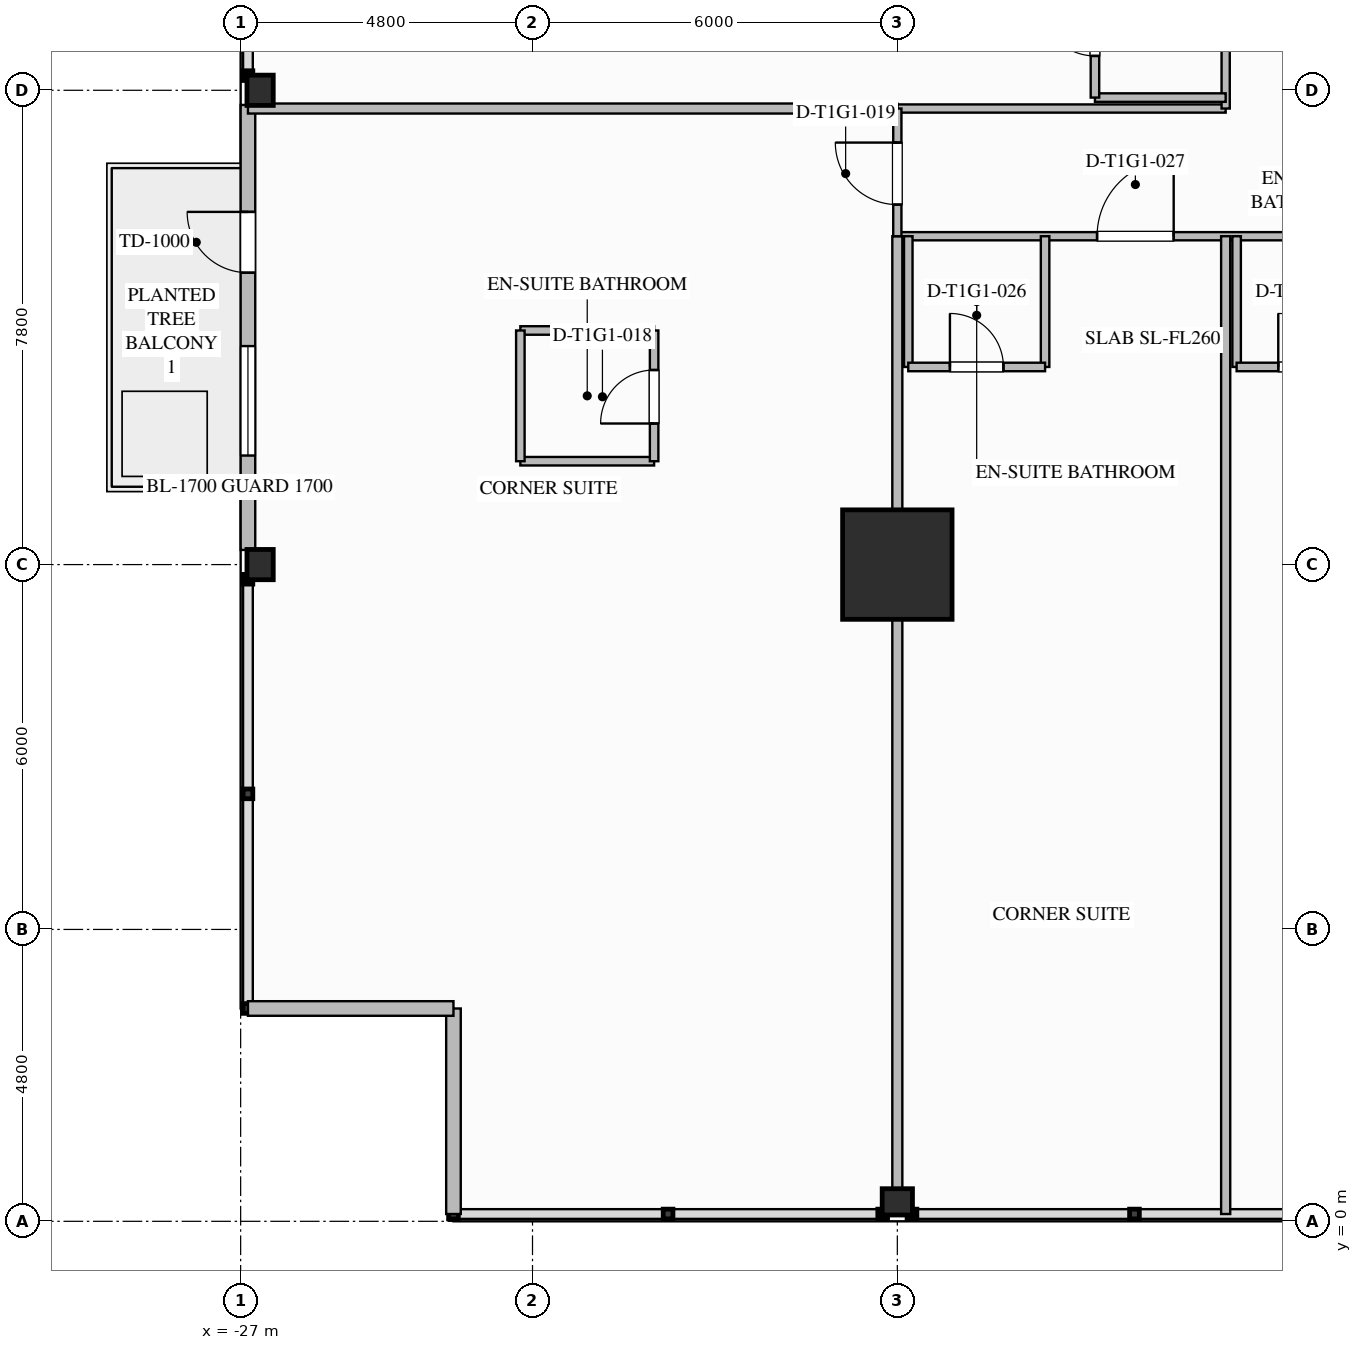
"""IFC4 building model, lengths in metres.
Left out: names, types, materials, properties, quantities, classifications, styles, units other than length and angle.
Written with IfcOpenShell. Run it as: python <this file> out.ifc"""

import sys

from ifc_helpers import new_model, si_unit, direction, frame, frame_2d, origin, origin_2d, place, context, subcontext, project, spatial, rectangle, i_section, extrude, element, fill, save


model = new_model("IFC4")
c1 = context("Model", 3, precision=1e-05, world=origin(), true_north=direction((0.0, 1.0)))
c2 = subcontext(c1, "Body", "Model", "MODEL_VIEW")
j1 = project(units=[si_unit("LENGTHUNIT", "METRE"), si_unit("PLANEANGLEUNIT", "RADIAN")], contexts=[c1])
p1 = place(None, origin())
s1 = spatial("IfcSite", under=j1, at=p1, CompositionType="ELEMENT")
p2 = place(p1, origin())
s2 = spatial("IfcBuilding", under=s1, at=p2, CompositionType="ELEMENT")
p3 = place(p2, frame((0.0, 0.0, 36.7)))
s3 = spatial("IfcBuildingStorey", under=s2, at=p3, CompositionType="ELEMENT", Elevation=36.7)
p4 = place(p3, frame((-16.2, 10.8, 0.0), z_axis=(0.0, 0.0, 1.0), x_axis=(1.0, 0.0, 0.0)))
e1 = element("IfcColumn", 1, at=p4, inside=s3, PredefinedType="COLUMN", context=c2, shape_type="SweptSolid", body=[
    extrude(rectangle(XDim=1.8, YDim=1.8, at=origin_2d()), origin(), (0.0, 0.0, 1.0), 3.5),
])
for number, where, z_axis, x_axis in (
    (2, (-26.68, 10.8, 0.0), (0.0, 0.0, 1.0), (1.0, 0.0, 0.0)),
    (3, (-26.68, 18.6, 0.0), (0.0, 0.0, 1.0), (1.0, 0.0, 0.0)),
    (4, (-16.2, 0.32, 0.0), (0.0, 0.0, 1.0), (0.0, 1.0, 0.0)),
):
    element("IfcColumn", number, at=place(p3, frame(where, z_axis=z_axis, x_axis=x_axis)), inside=s3, PredefinedType="COLUMN", context=c2, shape_type="SweptSolid", body=[
        extrude(i_section(OverallWidth=0.432, OverallDepth=0.498, WebThickness=0.056, FlangeThickness=0.089, FilletRadius=0.03, at=origin_2d()), origin(), (0.0, 0.0, 1.0), 3.497),
    ])
p5 = place(p3, frame((-26.88, 11.041, 0.0), z_axis=(0.0, 0.0, 1.0), x_axis=(0.0, 1.0, 0.0)))
e5 = element("IfcWall", 5, at=p5, inside=s3, PredefinedType="STANDARD", context=c2, shape_type="SweptSolid", body=[
    extrude(rectangle(XDim=7.318, YDim=0.24, at=frame_2d((3.659, 0.0))), origin(), (0.0, 0.0, 1.0), 2.629),
])
p6 = place(p5, frame((4.559, 0.0, 0.0)))
e6 = element("IfcOpeningElement", 6, at=p6, cuts=e5, PredefinedType="OPENING", context=c2, shape_type="SweptSolid", body=[
    extrude(rectangle(XDim=1.0, YDim=2.2, at=frame_2d((0.5, 1.1))), frame((0.0, 0.13, 0.0), z_axis=(0.0, -1.0, 0.0), x_axis=(1.0, 0.0, 0.0)), (0.0, 0.0, 1.0), 0.26),
])
p7 = place(p5, frame((1.552, 0.0, 0.75)))
e7 = element("IfcOpeningElement", 7, at=p7, cuts=e5, PredefinedType="OPENING", context=c2, shape_type="SweptSolid", body=[
    extrude(rectangle(XDim=1.8, YDim=1.779, at=frame_2d((0.9, 0.89))), frame((0.0, 0.13, 0.0), z_axis=(0.0, -1.0, 0.0), x_axis=(1.0, 0.0, 0.0)), (0.0, 0.0, 1.0), 0.26),
])
for number, where, z_axis, x_axis in (
    (8, (-23.5, 0.12, 0.0), (0.0, 0.0, 1.0), (0.0, 1.0, 0.0)),
    (9, (-23.5, 3.5, 0.0), (0.0, 0.0, 1.0), (-1.0, 0.0, 0.0)),
):
    element("IfcWall", number, at=place(p3, frame(where, z_axis=z_axis, x_axis=x_axis)), inside=s3, PredefinedType="STANDARD", context=c2, shape_type="SweptSolid", body=[
        extrude(rectangle(XDim=3.38, YDim=0.24, at=frame_2d((1.69, 0.0))), origin(), (0.0, 0.0, 1.0), 3.24),
    ])
p8 = place(p3, frame((-16.2, 16.2, 0.0), z_axis=(0.0, 0.0, 1.0), x_axis=(1.0, 0.0, 0.0)))
e10 = element("IfcWall", 10, at=p8, inside=s3, PredefinedType="PARTITIONING", context=c2, shape_type="SweptSolid", body=[
    extrude(rectangle(XDim=32.4, YDim=0.135, at=frame_2d((16.2, 0.0))), origin(), (0.0, 0.0, 1.0), 3.24),
])
p9 = place(p8, frame((3.285, 0.0, 0.0)))
e11 = element("IfcOpeningElement", 11, at=p9, cuts=e10, PredefinedType="OPENING", context=c2, shape_type="SweptSolid", body=[
    extrude(rectangle(XDim=1.26, YDim=2.2, at=frame_2d((0.63, 1.1))), frame((0.0, 0.077, 0.0), z_axis=(0.0, -1.0, 0.0), x_axis=(1.0, 0.0, 0.0)), (0.0, 0.0, 1.0), 0.155),
])
p10 = place(p8, frame((8.59, 0.0, 0.0)))
e12 = element("IfcOpeningElement", 12, at=p10, cuts=e10, PredefinedType="OPENING", context=c2, shape_type="SweptSolid", body=[
    extrude(rectangle(XDim=0.96, YDim=2.15, at=frame_2d((0.48, 1.075))), frame((0.0, 0.077, 0.0), z_axis=(0.0, -1.0, 0.0), x_axis=(1.0, 0.0, 0.0)), (0.0, 0.0, 1.0), 0.155),
])
p11 = place(p8, frame((13.84, 0.0, 0.0)))
e13 = element("IfcOpeningElement", 13, at=p11, cuts=e10, PredefinedType="OPENING", context=c2, shape_type="SweptSolid", body=[
    extrude(rectangle(XDim=1.26, YDim=2.2, at=frame_2d((0.63, 1.1))), frame((0.0, 0.077, 0.0), z_axis=(0.0, -1.0, 0.0), x_axis=(1.0, 0.0, 0.0)), (0.0, 0.0, 1.0), 0.155),
])
p12 = place(p8, frame((19.73, 0.0, 0.0)))
e14 = element("IfcOpeningElement", 14, at=p12, cuts=e10, PredefinedType="OPENING", context=c2, shape_type="SweptSolid", body=[
    extrude(rectangle(XDim=1.26, YDim=2.2, at=frame_2d((0.63, 1.1))), frame((0.0, 0.077, 0.0), z_axis=(0.0, -1.0, 0.0), x_axis=(1.0, 0.0, 0.0)), (0.0, 0.0, 1.0), 0.155),
])
p13 = place(p8, frame((25.281, 0.0, 0.0)))
e15 = element("IfcOpeningElement", 15, at=p13, cuts=e10, PredefinedType="OPENING", context=c2, shape_type="SweptSolid", body=[
    extrude(rectangle(XDim=0.96, YDim=2.15, at=frame_2d((0.48, 1.075))), frame((0.0, 0.077, 0.0), z_axis=(0.0, -1.0, 0.0), x_axis=(1.0, 0.0, 0.0)), (0.0, 0.0, 1.0), 0.155),
])
p14 = place(p8, frame((30.285, 0.0, 0.0)))
e16 = element("IfcOpeningElement", 16, at=p14, cuts=e10, PredefinedType="OPENING", context=c2, shape_type="SweptSolid", body=[
    extrude(rectangle(XDim=1.26, YDim=2.2, at=frame_2d((0.63, 1.1))), frame((0.0, 0.077, 0.0), z_axis=(0.0, -1.0, 0.0), x_axis=(1.0, 0.0, 0.0)), (0.0, 0.0, 1.0), 0.155),
])
p15 = place(p3, frame((-16.2, 18.3, 0.0), z_axis=(0.0, 0.0, 1.0), x_axis=(1.0, 0.0, 0.0)))
e17 = element("IfcWall", 17, at=p15, inside=s3, PredefinedType="PARTITIONING", context=c2, shape_type="SweptSolid", body=[
    extrude(rectangle(XDim=5.4, YDim=0.135, at=frame_2d((2.7, 0.0))), origin(), (0.0, 0.0, 1.0), 3.24),
])
p16 = place(p3, frame((-10.8, 18.3, 0.0), z_axis=(0.0, 0.0, 1.0), x_axis=(0.0, 1.0, 0.0)))
e18 = element("IfcWall", 18, at=p16, inside=s3, PredefinedType="PARTITIONING", context=c2, shape_type="SweptSolid", body=[
    extrude(rectangle(XDim=17.4, YDim=0.135, at=frame_2d((8.7, 0.0))), origin(), (0.0, 0.0, 1.0), 3.24),
])
p17 = place(p16, frame((2.91, 0.0, 0.0)))
e19 = element("IfcOpeningElement", 19, at=p17, cuts=e18, PredefinedType="OPENING", context=c2, shape_type="SweptSolid", body=[
    extrude(rectangle(XDim=0.96, YDim=2.15, at=frame_2d((0.48, 1.075))), frame((0.0, 0.077, 0.0), z_axis=(0.0, -1.0, 0.0), x_axis=(1.0, 0.0, 0.0)), (0.0, 0.0, 1.0), 0.155),
])
p18 = place(p16, frame((7.26, 0.0, 0.0)))
e20 = element("IfcOpeningElement", 20, at=p18, cuts=e18, PredefinedType="OPENING", context=c2, shape_type="SweptSolid", body=[
    extrude(rectangle(XDim=0.96, YDim=2.15, at=frame_2d((0.48, 1.075))), frame((0.0, 0.077, 0.0), z_axis=(0.0, -1.0, 0.0), x_axis=(1.0, 0.0, 0.0)), (0.0, 0.0, 1.0), 0.155),
])
p19 = place(p16, frame((11.61, 0.0, 0.0)))
e21 = element("IfcOpeningElement", 21, at=p19, cuts=e18, PredefinedType="OPENING", context=c2, shape_type="SweptSolid", body=[
    extrude(rectangle(XDim=0.96, YDim=2.15, at=frame_2d((0.48, 1.075))), frame((0.0, 0.077, 0.0), z_axis=(0.0, -1.0, 0.0), x_axis=(1.0, 0.0, 0.0)), (0.0, 0.0, 1.0), 0.155),
])
p20 = place(p16, frame((15.96, 0.0, 0.0)))
e22 = element("IfcOpeningElement", 22, at=p20, cuts=e18, PredefinedType="OPENING", context=c2, shape_type="SweptSolid", body=[
    extrude(rectangle(XDim=0.96, YDim=2.15, at=frame_2d((0.48, 1.075))), frame((0.0, 0.077, 0.0), z_axis=(0.0, -1.0, 0.0), x_axis=(1.0, 0.0, 0.0)), (0.0, 0.0, 1.0), 0.155),
])
p21 = place(p3, frame((-16.2, 0.12, 0.0), z_axis=(0.0, 0.0, 1.0), x_axis=(0.0, 1.0, 0.0)))
e23 = element("IfcWall", 23, at=p21, inside=s3, PredefinedType="PARTITIONING", context=c2, shape_type="SweptSolid", body=[
    extrude(rectangle(XDim=16.08, YDim=0.165, at=frame_2d((8.04, 0.0))), origin(), (0.0, 0.0, 1.0), 2.298),
])
p22 = place(p3, frame((-26.88, 18.3, 0.0), z_axis=(0.0, 0.0, 1.0), x_axis=(1.0, 0.0, 0.0)))
e24 = element("IfcWall", 24, at=p22, inside=s3, PredefinedType="PARTITIONING", context=c2, shape_type="SweptSolid", body=[
    extrude(rectangle(XDim=10.68, YDim=0.165, at=frame_2d((5.34, 0.0))), origin(), (0.0, 0.0, 1.0), 2.298),
])
p23 = place(p3, frame((-16.2, 16.2, 0.0), z_axis=(0.0, 0.0, 1.0), x_axis=(0.0, 1.0, 0.0)))
e25 = element("IfcWall", 25, at=p23, inside=s3, PredefinedType="PARTITIONING", context=c2, shape_type="SweptSolid", body=[
    extrude(rectangle(XDim=2.1, YDim=0.135, at=frame_2d((1.05, 0.0))), origin(), (0.0, 0.0, 1.0), 2.298),
])
p24 = place(p23, frame((0.52, 0.0, 0.0)))
e26 = element("IfcOpeningElement", 26, at=p24, cuts=e25, PredefinedType="OPENING", context=c2, shape_type="SweptSolid", body=[
    extrude(rectangle(XDim=1.02, YDim=2.15, at=frame_2d((0.51, 1.075))), frame((0.0, 0.077, 0.0), z_axis=(0.0, -1.0, 0.0), x_axis=(1.0, 0.0, 0.0)), (0.0, 0.0, 1.0), 0.155),
])
for number, where, z_axis, x_axis in (
    (27, (-22.4, 12.5, 0.0), (0.0, 0.0, 1.0), (1.0, 0.0, 0.0)),
    (28, (-22.4, 14.65, 0.0), (0.0, 0.0, 1.0), (1.0, 0.0, 0.0)),
):
    element("IfcWall", number, at=place(p3, frame(where, z_axis=z_axis, x_axis=x_axis)), inside=s3, PredefinedType="PLUMBINGWALL", context=c2, shape_type="SweptSolid", body=[
        extrude(rectangle(XDim=2.2, YDim=0.14, at=frame_2d((1.1, 0.0))), origin(), (0.0, 0.0, 1.0), 3.24),
    ])
p25 = place(p3, frame((-22.4, 12.5, 0.0), z_axis=(0.0, 0.0, 1.0), x_axis=(0.0, 1.0, 0.0)))
e29 = element("IfcWall", 29, at=p25, inside=s3, PredefinedType="PLUMBINGWALL", context=c2, shape_type="SweptSolid", body=[
    extrude(rectangle(XDim=2.15, YDim=0.14, at=frame_2d((1.075, 0.0))), origin(), (0.0, 0.0, 1.0), 3.24),
])
p26 = place(p3, frame((-20.2, 12.5, 0.0), z_axis=(0.0, 0.0, 1.0), x_axis=(0.0, 1.0, 0.0)))
e30 = element("IfcWall", 30, at=p26, inside=s3, PredefinedType="PLUMBINGWALL", context=c2, shape_type="SweptSolid", body=[
    extrude(rectangle(XDim=2.15, YDim=0.14, at=frame_2d((1.075, 0.0))), origin(), (0.0, 0.0, 1.0), 3.24),
])
p27 = place(p26, frame((0.62, 0.0, 0.0)))
e31 = element("IfcOpeningElement", 31, at=p27, cuts=e30, PredefinedType="OPENING", context=c2, shape_type="SweptSolid", body=[
    extrude(rectangle(XDim=0.88, YDim=2.1, at=frame_2d((0.44, 1.05))), frame((0.0, 0.08, 0.0), z_axis=(0.0, -1.0, 0.0), x_axis=(1.0, 0.0, 0.0)), (0.0, 0.0, 1.0), 0.16),
])
p28 = place(p3, frame((-16.02, 16.2, 0.0), z_axis=(0.0, 0.0, 1.0), x_axis=(0.0, -1.0, 0.0)))
e32 = element("IfcWall", 32, at=p28, inside=s3, PredefinedType="PLUMBINGWALL", context=c2, shape_type="SweptSolid", body=[
    extrude(rectangle(XDim=2.15, YDim=0.14, at=frame_2d((1.075, 0.0))), origin(), (0.0, 0.0, 1.0), 2.298),
])
p29 = place(p3, frame((-13.77, 16.2, 0.0), z_axis=(0.0, 0.0, 1.0), x_axis=(0.0, -1.0, 0.0)))
e33 = element("IfcWall", 33, at=p29, inside=s3, PredefinedType="PLUMBINGWALL", context=c2, shape_type="SweptSolid", body=[
    extrude(rectangle(XDim=2.15, YDim=0.14, at=frame_2d((1.075, 0.0))), origin(), (0.0, 0.0, 1.0), 3.24),
])
p30 = place(p3, frame((-16.02, 14.05, 0.0), z_axis=(0.0, 0.0, 1.0), x_axis=(1.0, 0.0, 0.0)))
e34 = element("IfcWall", 34, at=p30, inside=s3, PredefinedType="PLUMBINGWALL", context=c2, shape_type="SweptSolid", body=[
    extrude(rectangle(XDim=2.25, YDim=0.14, at=frame_2d((1.125, 0.0))), origin(), (0.0, 0.0, 1.0), 3.24),
])
p31 = place(p30, frame((0.685, 0.0, 0.0)))
e35 = element("IfcOpeningElement", 35, at=p31, cuts=e34, PredefinedType="OPENING", context=c2, shape_type="SweptSolid", body=[
    extrude(rectangle(XDim=0.88, YDim=2.1, at=frame_2d((0.44, 1.05))), frame((0.0, 0.08, 0.0), z_axis=(0.0, -1.0, 0.0), x_axis=(1.0, 0.0, 0.0)), (0.0, 0.0, 1.0), 0.16),
])
p32 = place(p3, frame((-10.8, 0.12, 0.0), z_axis=(0.0, 0.0, 1.0), x_axis=(0.0, 1.0, 0.0)))
e36 = element("IfcWall", 36, at=p32, inside=s3, PredefinedType="PARTITIONING", context=c2, shape_type="SweptSolid", body=[
    extrude(rectangle(XDim=16.08, YDim=0.15, at=frame_2d((8.04, 0.0))), origin(), (0.0, 0.0, 1.0), 3.24),
])
p33 = place(p3, frame((-10.62, 16.2, 0.0), z_axis=(0.0, 0.0, 1.0), x_axis=(0.0, -1.0, 0.0)))
e37 = element("IfcWall", 37, at=p33, inside=s3, PredefinedType="PLUMBINGWALL", context=c2, shape_type="SweptSolid", body=[
    extrude(rectangle(XDim=2.15, YDim=0.14, at=frame_2d((1.075, 0.0))), origin(), (0.0, 0.0, 1.0), 3.24),
])
p34 = place(p3, frame((-10.62, 14.05, 0.0), z_axis=(0.0, 0.0, 1.0), x_axis=(1.0, 0.0, 0.0)))
e38 = element("IfcWall", 38, at=p34, inside=s3, PredefinedType="PLUMBINGWALL", context=c2, shape_type="SweptSolid", body=[
    extrude(rectangle(XDim=2.25, YDim=0.14, at=frame_2d((1.125, 0.0))), origin(), (0.0, 0.0, 1.0), 3.24),
])
p35 = place(p34, frame((0.685, 0.0, 0.0)))
e39 = element("IfcOpeningElement", 39, at=p35, cuts=e38, PredefinedType="OPENING", context=c2, shape_type="SweptSolid", body=[
    extrude(rectangle(XDim=0.88, YDim=2.1, at=frame_2d((0.44, 1.05))), frame((0.0, 0.08, 0.0), z_axis=(0.0, -1.0, 0.0), x_axis=(1.0, 0.0, 0.0)), (0.0, 0.0, 1.0), 0.16),
])
p36 = place(p3, frame((-10.8, 18.48, 0.0), z_axis=(0.0, 0.0, 1.0), x_axis=(-1.0, 0.0, 0.0)))
e40 = element("IfcWall", 40, at=p36, inside=s3, PredefinedType="PLUMBINGWALL", context=c2, shape_type="SweptSolid", body=[
    extrude(rectangle(XDim=2.15, YDim=0.14, at=frame_2d((1.075, 0.0))), origin(), (0.0, 0.0, 1.0), 2.617),
])
p37 = place(p3, frame((-12.95, 18.48, 0.0), z_axis=(0.0, 0.0, 1.0), x_axis=(0.0, 1.0, 0.0)))
e41 = element("IfcWall", 41, at=p37, inside=s3, PredefinedType="PLUMBINGWALL", context=c2, shape_type="SweptSolid", body=[
    extrude(rectangle(XDim=2.25, YDim=0.14, at=frame_2d((1.125, 0.0))), origin(), (0.0, 0.0, 1.0), 3.24),
])
p38 = place(p37, frame((0.685, 0.0, 0.0)))
e42 = element("IfcOpeningElement", 42, at=p38, cuts=e41, PredefinedType="OPENING", context=c2, shape_type="SweptSolid", body=[
    extrude(rectangle(XDim=0.88, YDim=2.1, at=frame_2d((0.44, 1.05))), frame((0.0, 0.08, 0.0), z_axis=(0.0, -1.0, 0.0), x_axis=(1.0, 0.0, 0.0)), (0.0, 0.0, 1.0), 0.16),
])
p39 = place(p6, origin())
e43 = element("IfcDoor", 43, at=p39, inside=s3, OperationType="SINGLE_SWING_RIGHT", PredefinedType="DOOR", context=c2, shape_type="SweptSolid", body=[
    extrude(rectangle(XDim=1.0, YDim=2.2, at=frame_2d((0.5, 1.1))), frame((0.0, 0.025, 0.0), z_axis=(0.0, -1.0, 0.0), x_axis=(1.0, 0.0, 0.0)), (0.0, 0.0, 1.0), 0.05),
])
fill(e6, e43)
p40 = place(p7, origin())
e44 = element("IfcWindow", 44, at=p40, inside=s3, PartitioningType="SINGLE_PANEL", PredefinedType="WINDOW", context=c2, shape_type="SweptSolid", body=[
    extrude(rectangle(XDim=1.8, YDim=1.779, at=frame_2d((0.9, 0.89))), frame((0.0, 0.03, 0.0), z_axis=(0.0, -1.0, 0.0), x_axis=(1.0, 0.0, 0.0)), (0.0, 0.0, 1.0), 0.06),
])
fill(e7, e44)
p41 = place(p27, origin())
e45 = element("IfcDoor", 45, at=p41, inside=s3, OperationType="SINGLE_SWING_LEFT", PredefinedType="DOOR", context=c2, shape_type="SweptSolid", body=[
    extrude(rectangle(XDim=0.88, YDim=2.1, at=frame_2d((0.44, 1.05))), frame((0.0, 0.025, 0.0), z_axis=(0.0, -1.0, 0.0), x_axis=(1.0, 0.0, 0.0)), (0.0, 0.0, 1.0), 0.05),
])
fill(e31, e45)
p42 = place(p24, origin())
e46 = element("IfcDoor", 46, at=p42, inside=s3, OperationType="SINGLE_SWING_RIGHT", PredefinedType="DOOR", context=c2, shape_type="SweptSolid", body=[
    extrude(rectangle(XDim=1.02, YDim=2.15, at=frame_2d((0.51, 1.075))), frame((0.0, 0.025, 0.0), z_axis=(0.0, -1.0, 0.0), x_axis=(1.0, 0.0, 0.0)), (0.0, 0.0, 1.0), 0.05),
])
fill(e26, e46)
p43 = place(p31, origin())
e47 = element("IfcDoor", 47, at=p43, inside=s3, OperationType="SINGLE_SWING_LEFT", PredefinedType="DOOR", context=c2, shape_type="SweptSolid", body=[
    extrude(rectangle(XDim=0.88, YDim=2.1, at=frame_2d((0.44, 1.05))), frame((0.0, 0.025, 0.0), z_axis=(0.0, -1.0, 0.0), x_axis=(1.0, 0.0, 0.0)), (0.0, 0.0, 1.0), 0.05),
])
fill(e35, e47)
p44 = place(p9, origin())
e48 = element("IfcDoor", 48, at=p44, inside=s3, OperationType="SINGLE_SWING_RIGHT", PredefinedType="DOOR", context=c2, shape_type="SweptSolid", body=[
    extrude(rectangle(XDim=1.26, YDim=2.2, at=frame_2d((0.63, 1.1))), frame((0.0, 0.025, 0.0), z_axis=(0.0, -1.0, 0.0), x_axis=(1.0, 0.0, 0.0)), (0.0, 0.0, 1.0), 0.05),
])
fill(e11, e48)
p45 = place(p35, origin())
e49 = element("IfcDoor", 49, at=p45, inside=s3, OperationType="SINGLE_SWING_LEFT", PredefinedType="DOOR", context=c2, shape_type="SweptSolid", body=[
    extrude(rectangle(XDim=0.88, YDim=2.1, at=frame_2d((0.44, 1.05))), frame((0.0, 0.025, 0.0), z_axis=(0.0, -1.0, 0.0), x_axis=(1.0, 0.0, 0.0)), (0.0, 0.0, 1.0), 0.05),
])
fill(e39, e49)
p46 = place(p38, origin())
e50 = element("IfcDoor", 50, at=p46, inside=s3, OperationType="SINGLE_SWING_RIGHT", PredefinedType="DOOR", context=c2, shape_type="SweptSolid", body=[
    extrude(rectangle(XDim=0.88, YDim=2.1, at=frame_2d((0.44, 1.05))), frame((0.0, 0.025, 0.0), z_axis=(0.0, -1.0, 0.0), x_axis=(1.0, 0.0, 0.0)), (0.0, 0.0, 1.0), 0.05),
])
fill(e42, e50)
save(model, sys.argv[1])
